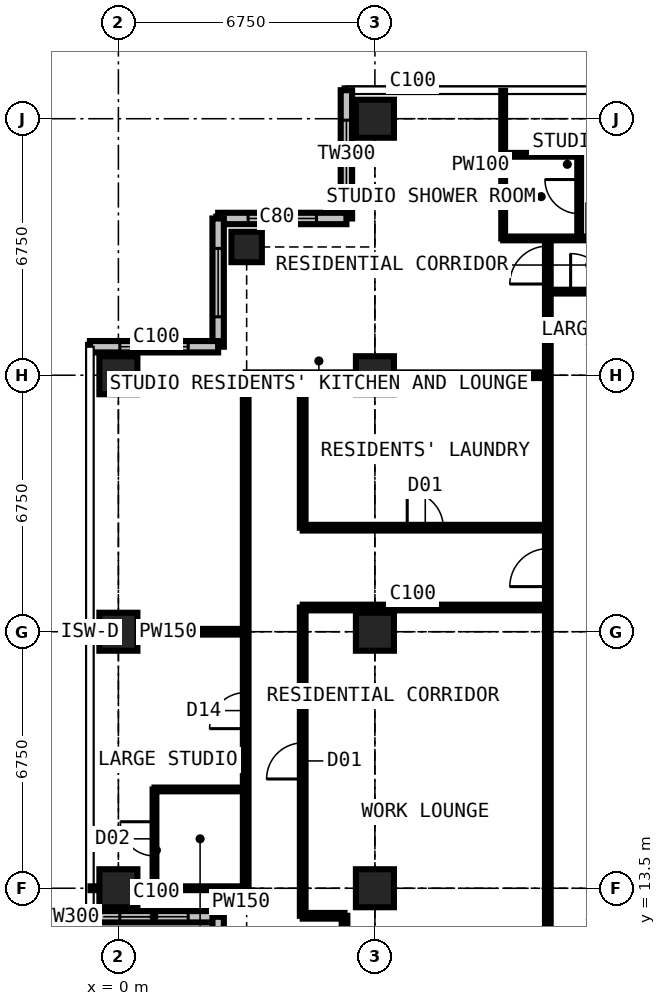
"""IFC4 building model, lengths in metres.
Left out: names, types, materials, properties, quantities, classifications, styles, units other than length and angle.
Written with IfcOpenShell. Run it as: python <this file> out.ifc"""

import sys

from ifc_helpers import new_model, si_unit, direction, frame, frame_2d, origin, origin_2d, place, context, subcontext, project, spatial, rectangle, extrude, element, fill, save


model = new_model("IFC4")
c1 = context("Model", 3, precision=1e-05, world=origin(), true_north=direction((0.0, 1.0)))
c2 = subcontext(c1, "Body", "Model", "MODEL_VIEW")
j1 = project(units=[si_unit("LENGTHUNIT", "METRE"), si_unit("PLANEANGLEUNIT", "RADIAN")], contexts=[c1])
p1 = place(None, origin())
s1 = spatial("IfcSite", under=j1, at=p1, CompositionType="ELEMENT")
p2 = place(p1, origin())
s2 = spatial("IfcBuilding", under=s1, at=p2, CompositionType="ELEMENT")
p3 = place(p2, frame((0.0, 0.0, 236.7)))
s3 = spatial("IfcBuildingStorey", under=s2, at=p3, CompositionType="ELEMENT", Elevation=236.7)
for number, where, z_axis, x_axis in (
    (1, (0.0, 13.5, 0.0), (0.0, 0.0, 1.0), (1.0, 0.0, 0.0)),
    (2, (0.0, 20.25, 0.0), (0.0, 0.0, 1.0), (1.0, 0.0, 0.0)),
    (3, (0.0, 27.0, 0.0), (0.0, 0.0, 1.0), (1.0, 0.0, 0.0)),
):
    element("IfcColumn", number, at=place(p3, frame(where, z_axis=z_axis, x_axis=x_axis)), inside=s3, PredefinedType="COLUMN", context=c2, shape_type="SweptSolid", body=[
        extrude(rectangle(XDim=1.0, YDim=1.0, at=origin_2d()), origin(), (0.0, 0.0, 1.0), 3.6),
    ])
p4 = place(p3, frame((3.375, 30.375, 0.0), z_axis=(0.0, 0.0, 1.0), x_axis=(1.0, 0.0, 0.0)))
e4 = element("IfcColumn", 4, at=p4, inside=s3, PredefinedType="COLUMN", context=c2, shape_type="SweptSolid", body=[
    extrude(rectangle(XDim=0.8, YDim=0.8, at=origin_2d()), origin(), (0.0, 0.0, 1.0), 3.6),
])
for number, where, z_axis, x_axis in (
    (5, (6.75, 13.5, 0.0), (0.0, 0.0, 1.0), (1.0, 0.0, 0.0)),
    (6, (6.75, 20.25, 0.0), (0.0, 0.0, 1.0), (1.0, 0.0, 0.0)),
    (7, (6.75, 27.0, 0.0), (0.0, 0.0, 1.0), (1.0, 0.0, 0.0)),
    (8, (6.75, 33.75, 0.0), (0.0, 0.0, 1.0), (1.0, 0.0, 0.0)),
):
    element("IfcColumn", number, at=place(p3, frame(where, z_axis=z_axis, x_axis=x_axis)), inside=s3, PredefinedType="COLUMN", context=c2, shape_type="SweptSolid", body=[
        extrude(rectangle(XDim=1.0, YDim=1.0, at=origin_2d()), origin(), (0.0, 0.0, 1.0), 3.6),
    ])
p5 = place(p3, frame((6.0, 34.5, 0.0), z_axis=(0.0, 0.0, 1.0), x_axis=(0.0, -1.0, 0.0)))
e9 = element("IfcWall", 9, at=p5, inside=s3, PredefinedType="SOLIDWALL", context=c2, shape_type="SweptSolid", body=[
    extrude(rectangle(XDim=3.375, YDim=0.3, at=frame_2d((1.688, 0.0))), origin(), (0.0, 0.0, 1.0), 3.375),
])
p6 = place(p5, frame((0.788, 0.0, 0.6)))
e10 = element("IfcOpeningElement", 10, at=p6, cuts=e9, PredefinedType="OPENING", context=c2, shape_type="SweptSolid", body=[
    extrude(rectangle(XDim=1.8, YDim=2.1, at=frame_2d((0.9, 1.05))), frame((0.0, 0.16, 0.0), z_axis=(0.0, -1.0, 0.0), x_axis=(1.0, 0.0, 0.0)), (0.0, 0.0, 1.0), 0.32),
])
p7 = place(p3, frame((6.0, 31.125, 0.0), z_axis=(0.0, 0.0, 1.0), x_axis=(-1.0, 0.0, 0.0)))
e11 = element("IfcWall", 11, at=p7, inside=s3, PredefinedType="SOLIDWALL", context=c2, shape_type="SweptSolid", body=[
    extrude(rectangle(XDim=3.375, YDim=0.3, at=frame_2d((1.688, 0.0))), origin(), (0.0, 0.0, 1.0), 3.375),
])
p8 = place(p7, frame((0.788, 0.0, 0.6)))
e12 = element("IfcOpeningElement", 12, at=p8, cuts=e11, PredefinedType="OPENING", context=c2, shape_type="SweptSolid", body=[
    extrude(rectangle(XDim=1.8, YDim=2.1, at=frame_2d((0.9, 1.05))), frame((0.0, 0.16, 0.0), z_axis=(0.0, -1.0, 0.0), x_axis=(1.0, 0.0, 0.0)), (0.0, 0.0, 1.0), 0.32),
])
p9 = place(p3, frame((2.625, 31.125, 0.0), z_axis=(0.0, 0.0, 1.0), x_axis=(0.0, -1.0, 0.0)))
e13 = element("IfcWall", 13, at=p9, inside=s3, PredefinedType="SOLIDWALL", context=c2, shape_type="SweptSolid", body=[
    extrude(rectangle(XDim=3.375, YDim=0.3, at=frame_2d((1.688, 0.0))), origin(), (0.0, 0.0, 1.0), 3.375),
])
p10 = place(p9, frame((0.788, 0.0, 0.6)))
e14 = element("IfcOpeningElement", 14, at=p10, cuts=e13, PredefinedType="OPENING", context=c2, shape_type="SweptSolid", body=[
    extrude(rectangle(XDim=1.8, YDim=2.1, at=frame_2d((0.9, 1.05))), frame((0.0, 0.16, 0.0), z_axis=(0.0, -1.0, 0.0), x_axis=(1.0, 0.0, 0.0)), (0.0, 0.0, 1.0), 0.32),
])
p11 = place(p3, frame((2.625, 27.75, 0.0), z_axis=(0.0, 0.0, 1.0), x_axis=(-1.0, 0.0, 0.0)))
e15 = element("IfcWall", 15, at=p11, inside=s3, PredefinedType="SOLIDWALL", context=c2, shape_type="SweptSolid", body=[
    extrude(rectangle(XDim=3.375, YDim=0.3, at=frame_2d((1.688, 0.0))), origin(), (0.0, 0.0, 1.0), 3.375),
])
p12 = place(p11, frame((0.788, 0.0, 0.6)))
e16 = element("IfcOpeningElement", 16, at=p12, cuts=e15, PredefinedType="OPENING", context=c2, shape_type="SweptSolid", body=[
    extrude(rectangle(XDim=1.8, YDim=2.1, at=frame_2d((0.9, 1.05))), frame((0.0, 0.16, 0.0), z_axis=(0.0, -1.0, 0.0), x_axis=(1.0, 0.0, 0.0)), (0.0, 0.0, 1.0), 0.32),
])
p13 = place(p3, frame((-0.75, 12.75, 0.0), z_axis=(0.0, 0.0, 1.0), x_axis=(1.0, 0.0, 0.0)))
e17 = element("IfcWall", 17, at=p13, inside=s3, PredefinedType="SOLIDWALL", context=c2, shape_type="SweptSolid", body=[
    extrude(rectangle(XDim=3.375, YDim=0.3, at=frame_2d((1.688, 0.0))), origin(), (0.0, 0.0, 1.0), 3.375),
])
p14 = place(p13, frame((0.788, 0.0, 0.6)))
e18 = element("IfcOpeningElement", 18, at=p14, cuts=e17, PredefinedType="OPENING", context=c2, shape_type="SweptSolid", body=[
    extrude(rectangle(XDim=1.8, YDim=2.1, at=frame_2d((0.9, 1.05))), frame((0.0, 0.16, 0.0), z_axis=(0.0, -1.0, 0.0), x_axis=(1.0, 0.0, 0.0)), (0.0, 0.0, 1.0), 0.32),
])
p15 = place(p3, frame((2.625, 12.75, 0.0), z_axis=(0.0, 0.0, 1.0), x_axis=(0.0, -1.0, 0.0)))
e19 = element("IfcWall", 19, at=p15, inside=s3, PredefinedType="SOLIDWALL", context=c2, shape_type="SweptSolid", body=[
    extrude(rectangle(XDim=3.375, YDim=0.3, at=frame_2d((1.688, 0.0))), origin(), (0.0, 0.0, 1.0), 3.375),
])
p16 = place(p15, frame((0.788, 0.0, 0.6)))
e20 = element("IfcOpeningElement", 20, at=p16, cuts=e19, PredefinedType="OPENING", context=c2, shape_type="SweptSolid", body=[
    extrude(rectangle(XDim=1.8, YDim=2.1, at=frame_2d((0.9, 1.05))), frame((0.0, 0.16, 0.0), z_axis=(0.0, -1.0, 0.0), x_axis=(1.0, 0.0, 0.0)), (0.0, 0.0, 1.0), 0.32),
])
p17 = place(p3, frame((-0.734, 13.5, 0.0), z_axis=(0.0, 0.0, 1.0), x_axis=(1.0, 0.0, 0.0)))
e21 = element("IfcWall", 21, at=p17, inside=s3, PredefinedType="PARTITIONING", context=c2, shape_type="SweptSolid", body=[
    extrude(rectangle(XDim=4.084, YDim=0.1, at=frame_2d((2.042, 0.0))), origin(), (0.0, 0.0, 1.0), 2.877),
])
p18 = place(p3, frame((-0.734, 20.25, 0.0), z_axis=(0.0, 0.0, 1.0), x_axis=(1.0, 0.0, 0.0)))
e22 = element("IfcWall", 22, at=p18, inside=s3, PredefinedType="PARTITIONING", context=c2, shape_type="SweptSolid", body=[
    extrude(rectangle(XDim=4.084, YDim=0.15, at=frame_2d((2.042, 0.0))), origin(), (0.0, 0.0, 1.0), 2.877),
])
p19 = place(p3, frame((0.95, 13.5, 0.0), z_axis=(0.0, 0.0, 1.0), x_axis=(0.0, 1.0, 0.0)))
e23 = element("IfcWall", 23, at=p19, inside=s3, PredefinedType="PARTITIONING", context=c2, shape_type="SweptSolid", body=[
    extrude(rectangle(XDim=2.6, YDim=0.1, at=frame_2d((1.3, 0.0))), origin(), (0.0, 0.0, 1.0), 3.375),
])
p20 = place(p19, frame((0.85, 0.0, 0.0)))
e24 = element("IfcOpeningElement", 24, at=p20, cuts=e23, PredefinedType="OPENING", context=c2, shape_type="SweptSolid", body=[
    extrude(rectangle(XDim=0.9, YDim=2.2, at=frame_2d((0.45, 1.1))), frame((0.0, 0.06, 0.0), z_axis=(0.0, -1.0, 0.0), x_axis=(1.0, 0.0, 0.0)), (0.0, 0.0, 1.0), 0.12),
])
p21 = place(p3, frame((0.95, 16.1, 0.0), z_axis=(0.0, 0.0, 1.0), x_axis=(1.0, 0.0, 0.0)))
e25 = element("IfcWall", 25, at=p21, inside=s3, PredefinedType="PARTITIONING", context=c2, shape_type="SweptSolid", body=[
    extrude(rectangle(XDim=2.4, YDim=0.1, at=frame_2d((1.2, 0.0))), origin(), (0.0, 0.0, 1.0), 3.375),
])
p22 = place(p3, frame((2.625, 12.766, 0.0), z_axis=(0.0, 0.0, 1.0), x_axis=(0.0, 1.0, 0.0)))
e26 = element("IfcWall", 26, at=p22, inside=s3, PredefinedType="PARTITIONING", context=c2, shape_type="SweptSolid", body=[
    extrude(rectangle(XDim=0.734, YDim=0.15, at=frame_2d((0.367, 0.0))), origin(), (0.0, 0.0, 1.0), 3.375),
])
p23 = place(p3, frame((3.35, 13.5, 0.0), z_axis=(0.0, 0.0, 1.0), x_axis=(0.0, 1.0, 0.0)))
e27 = element("IfcWall", 27, at=p23, inside=s3, PredefinedType="PARTITIONING", context=c2, shape_type="SweptSolid", body=[
    extrude(rectangle(XDim=13.5, YDim=0.15, at=frame_2d((6.75, 0.0))), origin(), (0.0, 0.0, 1.0), 3.375),
])
p24 = place(p23, frame((4.2, 0.0, 0.0)))
e28 = element("IfcOpeningElement", 28, at=p24, cuts=e27, PredefinedType="OPENING", context=c2, shape_type="SweptSolid", body=[
    extrude(rectangle(XDim=0.95, YDim=2.2, at=frame_2d((0.475, 1.1))), frame((0.0, 0.085, 0.0), z_axis=(0.0, -1.0, 0.0), x_axis=(1.0, 0.0, 0.0)), (0.0, 0.0, 1.0), 0.17),
])
p25 = place(p3, frame((3.35, 27.0, 0.0), z_axis=(0.0, 0.0, 1.0), x_axis=(1.0, 0.0, 0.0)))
e29 = element("IfcWall", 29, at=p25, inside=s3, PredefinedType="PARTITIONING", context=c2, shape_type="SweptSolid", body=[
    extrude(rectangle(XDim=7.95, YDim=0.15, at=frame_2d((3.975, 0.0))), origin(), (0.0, 0.0, 1.0), 2.877),
])
p26 = place(p3, frame((4.85, 12.775, 0.0), z_axis=(0.0, 0.0, 1.0), x_axis=(0.0, 1.0, 0.0)))
e30 = element("IfcWall", 30, at=p26, inside=s3, PredefinedType="PARTITIONING", context=c2, shape_type="SweptSolid", body=[
    extrude(rectangle(XDim=8.113, YDim=0.15, at=frame_2d((4.056, 0.0))), origin(), (0.0, 0.0, 1.0), 3.375),
])
p27 = place(p26, frame((3.6, 0.0, 0.0)))
e31 = element("IfcOpeningElement", 31, at=p27, cuts=e30, PredefinedType="OPENING", context=c2, shape_type="SweptSolid", body=[
    extrude(rectangle(XDim=0.95, YDim=2.2, at=frame_2d((0.475, 1.1))), frame((0.0, 0.085, 0.0), z_axis=(0.0, -1.0, 0.0), x_axis=(1.0, 0.0, 0.0)), (0.0, 0.0, 1.0), 0.17),
])
p28 = place(p3, frame((4.85, 12.775, 0.0), z_axis=(0.0, 0.0, 1.0), x_axis=(1.0, 0.0, 0.0)))
e32 = element("IfcWall", 32, at=p28, inside=s3, PredefinedType="PARTITIONING", context=c2, shape_type="SweptSolid", body=[
    extrude(rectangle(XDim=1.1, YDim=0.15, at=frame_2d((0.55, 0.0))), origin(), (0.0, 0.0, 1.0), 3.375),
])
p29 = place(p3, frame((4.85, 20.887, 0.0), z_axis=(0.0, 0.0, 1.0), x_axis=(1.0, 0.0, 0.0)))
e33 = element("IfcWall", 33, at=p29, inside=s3, PredefinedType="PARTITIONING", context=c2, shape_type="SweptSolid", body=[
    extrude(rectangle(XDim=6.45, YDim=0.15, at=frame_2d((3.225, 0.0))), origin(), (0.0, 0.0, 1.0), 3.375),
])
p30 = place(p3, frame((4.85, 22.988, 0.0), z_axis=(0.0, 0.0, 1.0), x_axis=(0.0, 1.0, 0.0)))
e34 = element("IfcWall", 34, at=p30, inside=s3, PredefinedType="PARTITIONING", context=c2, shape_type="SweptSolid", body=[
    extrude(rectangle(XDim=4.012, YDim=0.15, at=frame_2d((2.006, 0.0))), origin(), (0.0, 0.0, 1.0), 3.375),
])
p31 = place(p3, frame((4.85, 22.988, 0.0), z_axis=(0.0, 0.0, 1.0), x_axis=(1.0, 0.0, 0.0)))
e35 = element("IfcWall", 35, at=p31, inside=s3, PredefinedType="PARTITIONING", context=c2, shape_type="SweptSolid", body=[
    extrude(rectangle(XDim=6.45, YDim=0.15, at=frame_2d((3.225, 0.0))), origin(), (0.0, 0.0, 1.0), 3.375),
])
p32 = place(p31, frame((2.75, 0.0, 0.0)))
e36 = element("IfcOpeningElement", 36, at=p32, cuts=e35, PredefinedType="OPENING", context=c2, shape_type="SweptSolid", body=[
    extrude(rectangle(XDim=0.95, YDim=2.2, at=frame_2d((0.475, 1.1))), frame((0.0, 0.085, 0.0), z_axis=(0.0, -1.0, 0.0), x_axis=(1.0, 0.0, 0.0)), (0.0, 0.0, 1.0), 0.17),
])
p33 = place(p3, frame((5.95, 10.125, 0.0), z_axis=(0.0, 0.0, 1.0), x_axis=(0.0, 1.0, 0.0)))
e37 = element("IfcWall", 37, at=p33, inside=s3, PredefinedType="PARTITIONING", context=c2, shape_type="SweptSolid", body=[
    extrude(rectangle(XDim=2.65, YDim=0.15, at=frame_2d((1.325, 0.0))), origin(), (0.0, 0.0, 1.0), 3.375),
])
p34 = place(p3, frame((10.125, 30.6, 0.0), z_axis=(0.0, 0.0, 1.0), x_axis=(0.0, 1.0, 0.0)))
e38 = element("IfcWall", 38, at=p34, inside=s3, PredefinedType="PARTITIONING", context=c2, shape_type="SweptSolid", body=[
    extrude(rectangle(XDim=3.884, YDim=0.1, at=frame_2d((1.942, 0.0))), origin(), (0.0, 0.0, 1.0), 3.375),
])
p35 = place(p3, frame((10.125, 30.6, 0.0), z_axis=(0.0, 0.0, 1.0), x_axis=(1.0, 0.0, 0.0)))
e39 = element("IfcWall", 39, at=p35, inside=s3, PredefinedType="PARTITIONING", context=c2, shape_type="SweptSolid", body=[
    extrude(rectangle(XDim=3.375, YDim=0.1, at=frame_2d((1.688, 0.0))), origin(), (0.0, 0.0, 1.0), 3.375),
])
p36 = place(p35, frame((2.2, 0.0, 0.0)))
e40 = element("IfcOpeningElement", 40, at=p36, cuts=e39, PredefinedType="OPENING", context=c2, shape_type="SweptSolid", body=[
    extrude(rectangle(XDim=0.95, YDim=2.2, at=frame_2d((0.475, 1.1))), frame((0.0, 0.06, 0.0), z_axis=(0.0, -1.0, 0.0), x_axis=(1.0, 0.0, 0.0)), (0.0, 0.0, 1.0), 0.12),
])
p37 = place(p3, frame((10.125, 32.8, 0.0), z_axis=(0.0, 0.0, 1.0), x_axis=(1.0, 0.0, 0.0)))
e41 = element("IfcWall", 41, at=p37, inside=s3, PredefinedType="PARTITIONING", context=c2, shape_type="SweptSolid", body=[
    extrude(rectangle(XDim=2.0, YDim=0.1, at=frame_2d((1.0, 0.0))), origin(), (0.0, 0.0, 1.0), 3.375),
])
p38 = place(p3, frame((11.3, 11.3, 0.0), z_axis=(0.0, 0.0, 1.0), x_axis=(0.0, 1.0, 0.0)))
e42 = element("IfcWall", 42, at=p38, inside=s3, PredefinedType="PARTITIONING", context=c2, shape_type="SweptSolid", body=[
    extrude(rectangle(XDim=19.3, YDim=0.15, at=frame_2d((9.65, 0.0))), origin(), (0.0, 0.0, 1.0), 3.375),
])
p39 = place(p38, frame((18.1, 0.0, 0.0)))
e43 = element("IfcOpeningElement", 43, at=p39, cuts=e42, PredefinedType="OPENING", context=c2, shape_type="SweptSolid", body=[
    extrude(rectangle(XDim=1.0, YDim=2.2, at=frame_2d((0.5, 1.1))), frame((0.0, 0.085, 0.0), z_axis=(0.0, -1.0, 0.0), x_axis=(1.0, 0.0, 0.0)), (0.0, 0.0, 1.0), 0.17),
])
p40 = place(p38, frame((10.137, 0.0, 0.0)))
e44 = element("IfcOpeningElement", 44, at=p40, cuts=e42, PredefinedType="OPENING", context=c2, shape_type="SweptSolid", body=[
    extrude(rectangle(XDim=1.0, YDim=2.2, at=frame_2d((0.5, 1.1))), frame((0.0, 0.085, 0.0), z_axis=(0.0, -1.0, 0.0), x_axis=(1.0, 0.0, 0.0)), (0.0, 0.0, 1.0), 0.17),
])
p41 = place(p3, frame((11.3, 29.2, 0.0), z_axis=(0.0, 0.0, 1.0), x_axis=(1.0, 0.0, 0.0)))
e45 = element("IfcWall", 45, at=p41, inside=s3, PredefinedType="PARTITIONING", context=c2, shape_type="SweptSolid", body=[
    extrude(rectangle(XDim=19.809, YDim=0.1, at=frame_2d((9.904, 0.0))), origin(), (0.0, 0.0, 1.0), 3.375),
])
p42 = place(p41, frame((16.3, 0.0, 0.0)))
e46 = element("IfcOpeningElement", 46, at=p42, cuts=e45, PredefinedType="OPENING", context=c2, shape_type="SweptSolid", body=[
    extrude(rectangle(XDim=1.0, YDim=2.2, at=frame_2d((0.5, 1.1))), frame((0.0, 0.06, 0.0), z_axis=(0.0, -1.0, 0.0), x_axis=(1.0, 0.0, 0.0)), (0.0, 0.0, 1.0), 0.12),
])
p43 = place(p41, frame((6.4, 0.0, 0.0)))
e47 = element("IfcOpeningElement", 47, at=p43, cuts=e45, PredefinedType="OPENING", context=c2, shape_type="SweptSolid", body=[
    extrude(rectangle(XDim=0.95, YDim=2.2, at=frame_2d((0.475, 1.1))), frame((0.0, 0.06, 0.0), z_axis=(0.0, -1.0, 0.0), x_axis=(1.0, 0.0, 0.0)), (0.0, 0.0, 1.0), 0.12),
])
p44 = place(p41, frame((13.15, 0.0, 0.0)))
e48 = element("IfcOpeningElement", 48, at=p44, cuts=e45, PredefinedType="OPENING", context=c2, shape_type="SweptSolid", body=[
    extrude(rectangle(XDim=0.95, YDim=2.2, at=frame_2d((0.475, 1.1))), frame((0.0, 0.06, 0.0), z_axis=(0.0, -1.0, 0.0), x_axis=(1.0, 0.0, 0.0)), (0.0, 0.0, 1.0), 0.12),
])
p45 = place(p41, frame((0.6, 0.0, 0.0)))
e49 = element("IfcOpeningElement", 49, at=p45, cuts=e45, PredefinedType="OPENING", context=c2, shape_type="SweptSolid", body=[
    extrude(rectangle(XDim=1.0, YDim=2.2, at=frame_2d((0.5, 1.1))), frame((0.0, 0.06, 0.0), z_axis=(0.0, -1.0, 0.0), x_axis=(1.0, 0.0, 0.0)), (0.0, 0.0, 1.0), 0.12),
])
p46 = place(p3, frame((12.125, 30.6, 0.0), z_axis=(0.0, 0.0, 1.0), x_axis=(0.0, 1.0, 0.0)))
e50 = element("IfcWall", 50, at=p46, inside=s3, PredefinedType="PARTITIONING", context=c2, shape_type="SweptSolid", body=[
    extrude(rectangle(XDim=2.2, YDim=0.1, at=frame_2d((1.1, 0.0))), origin(), (0.0, 0.0, 1.0), 3.375),
])
p47 = place(p46, frame((0.65, 0.0, 0.0)))
e51 = element("IfcOpeningElement", 51, at=p47, cuts=e50, PredefinedType="OPENING", context=c2, shape_type="SweptSolid", body=[
    extrude(rectangle(XDim=0.9, YDim=2.2, at=frame_2d((0.45, 1.1))), frame((0.0, 0.06, 0.0), z_axis=(0.0, -1.0, 0.0), x_axis=(1.0, 0.0, 0.0)), (0.0, 0.0, 1.0), 0.12),
])
p48 = place(p6, origin())
e52 = element("IfcWindow", 52, at=p48, inside=s3, PartitioningType="SINGLE_PANEL", PredefinedType="WINDOW", context=c2, shape_type="SweptSolid", body=[
    extrude(rectangle(XDim=1.8, YDim=2.1, at=frame_2d((0.9, 1.05))), frame((0.0, 0.03, 0.0), z_axis=(0.0, -1.0, 0.0), x_axis=(1.0, 0.0, 0.0)), (0.0, 0.0, 1.0), 0.06),
])
fill(e10, e52)
p49 = place(p8, origin())
e53 = element("IfcWindow", 53, at=p49, inside=s3, PartitioningType="SINGLE_PANEL", PredefinedType="WINDOW", context=c2, shape_type="SweptSolid", body=[
    extrude(rectangle(XDim=1.8, YDim=2.1, at=frame_2d((0.9, 1.05))), frame((0.0, 0.03, 0.0), z_axis=(0.0, -1.0, 0.0), x_axis=(1.0, 0.0, 0.0)), (0.0, 0.0, 1.0), 0.06),
])
fill(e12, e53)
p50 = place(p10, origin())
e54 = element("IfcWindow", 54, at=p50, inside=s3, PartitioningType="SINGLE_PANEL", PredefinedType="WINDOW", context=c2, shape_type="SweptSolid", body=[
    extrude(rectangle(XDim=1.8, YDim=2.1, at=frame_2d((0.9, 1.05))), frame((0.0, 0.03, 0.0), z_axis=(0.0, -1.0, 0.0), x_axis=(1.0, 0.0, 0.0)), (0.0, 0.0, 1.0), 0.06),
])
fill(e14, e54)
p51 = place(p12, origin())
e55 = element("IfcWindow", 55, at=p51, inside=s3, PartitioningType="SINGLE_PANEL", PredefinedType="WINDOW", context=c2, shape_type="SweptSolid", body=[
    extrude(rectangle(XDim=1.8, YDim=2.1, at=frame_2d((0.9, 1.05))), frame((0.0, 0.03, 0.0), z_axis=(0.0, -1.0, 0.0), x_axis=(1.0, 0.0, 0.0)), (0.0, 0.0, 1.0), 0.06),
])
fill(e16, e55)
p52 = place(p14, origin())
e56 = element("IfcWindow", 56, at=p52, inside=s3, PartitioningType="SINGLE_PANEL", PredefinedType="WINDOW", context=c2, shape_type="SweptSolid", body=[
    extrude(rectangle(XDim=1.8, YDim=2.1, at=frame_2d((0.9, 1.05))), frame((0.0, 0.03, 0.0), z_axis=(0.0, -1.0, 0.0), x_axis=(1.0, 0.0, 0.0)), (0.0, 0.0, 1.0), 0.06),
])
fill(e18, e56)
p53 = place(p47, origin())
e57 = element("IfcDoor", 57, at=p53, inside=s3, OperationType="SINGLE_SWING_RIGHT", PredefinedType="DOOR", context=c2, shape_type="SweptSolid", body=[
    extrude(rectangle(XDim=0.9, YDim=2.2, at=frame_2d((0.45, 1.1))), frame((0.0, 0.025, 0.0), z_axis=(0.0, -1.0, 0.0), x_axis=(1.0, 0.0, 0.0)), (0.0, 0.0, 1.0), 0.05),
])
fill(e51, e57)
p54 = place(p45, origin())
e58 = element("IfcDoor", 58, at=p54, inside=s3, OperationType="SINGLE_SWING_LEFT", PredefinedType="DOOR", context=c2, shape_type="SweptSolid", body=[
    extrude(rectangle(XDim=1.0, YDim=2.2, at=frame_2d((0.5, 1.1))), frame((0.0, 0.025, 0.0), z_axis=(0.0, -1.0, 0.0), x_axis=(1.0, 0.0, 0.0)), (0.0, 0.0, 1.0), 0.05),
])
fill(e49, e58)
p55 = place(p39, origin())
e59 = element("IfcDoor", 59, at=p55, inside=s3, OperationType="SINGLE_SWING_LEFT", PredefinedType="DOOR", context=c2, shape_type="SweptSolid", body=[
    extrude(rectangle(XDim=1.0, YDim=2.2, at=frame_2d((0.5, 1.1))), frame((0.0, 0.025, 0.0), z_axis=(0.0, -1.0, 0.0), x_axis=(1.0, 0.0, 0.0)), (0.0, 0.0, 1.0), 0.05),
])
fill(e43, e59)
p56 = place(p24, origin())
e60 = element("IfcDoor", 60, at=p56, inside=s3, OperationType="SINGLE_SWING_LEFT", PredefinedType="DOOR", context=c2, shape_type="SweptSolid", body=[
    extrude(rectangle(XDim=0.95, YDim=2.2, at=frame_2d((0.475, 1.1))), frame((0.0, 0.025, 0.0), z_axis=(0.0, -1.0, 0.0), x_axis=(1.0, 0.0, 0.0)), (0.0, 0.0, 1.0), 0.05),
])
fill(e28, e60)
p57 = place(p20, origin())
e61 = element("IfcDoor", 61, at=p57, inside=s3, OperationType="SINGLE_SWING_RIGHT", PredefinedType="DOOR", context=c2, shape_type="SweptSolid", body=[
    extrude(rectangle(XDim=0.9, YDim=2.2, at=frame_2d((0.45, 1.1))), frame((0.0, 0.025, 0.0), z_axis=(0.0, -1.0, 0.0), x_axis=(1.0, 0.0, 0.0)), (0.0, 0.0, 1.0), 0.05),
])
fill(e24, e61)
p58 = place(p40, origin())
e62 = element("IfcDoor", 62, at=p58, inside=s3, OperationType="SINGLE_SWING_LEFT", PredefinedType="DOOR", context=c2, shape_type="SweptSolid", body=[
    extrude(rectangle(XDim=1.0, YDim=2.2, at=frame_2d((0.5, 1.1))), frame((0.0, 0.025, 0.0), z_axis=(0.0, -1.0, 0.0), x_axis=(1.0, 0.0, 0.0)), (0.0, 0.0, 1.0), 0.05),
])
fill(e44, e62)
p59 = place(p32, origin())
e63 = element("IfcDoor", 63, at=p59, inside=s3, OperationType="SINGLE_SWING_LEFT", PredefinedType="DOOR", context=c2, shape_type="SweptSolid", body=[
    extrude(rectangle(XDim=0.95, YDim=2.2, at=frame_2d((0.475, 1.1))), frame((0.0, 0.025, 0.0), z_axis=(0.0, -1.0, 0.0), x_axis=(1.0, 0.0, 0.0)), (0.0, 0.0, 1.0), 0.05),
])
fill(e36, e63)
p60 = place(p27, origin())
e64 = element("IfcDoor", 64, at=p60, inside=s3, OperationType="SINGLE_SWING_LEFT", PredefinedType="DOOR", context=c2, shape_type="SweptSolid", body=[
    extrude(rectangle(XDim=0.95, YDim=2.2, at=frame_2d((0.475, 1.1))), frame((0.0, 0.025, 0.0), z_axis=(0.0, -1.0, 0.0), x_axis=(1.0, 0.0, 0.0)), (0.0, 0.0, 1.0), 0.05),
])
fill(e31, e64)
save(model, sys.argv[1])
